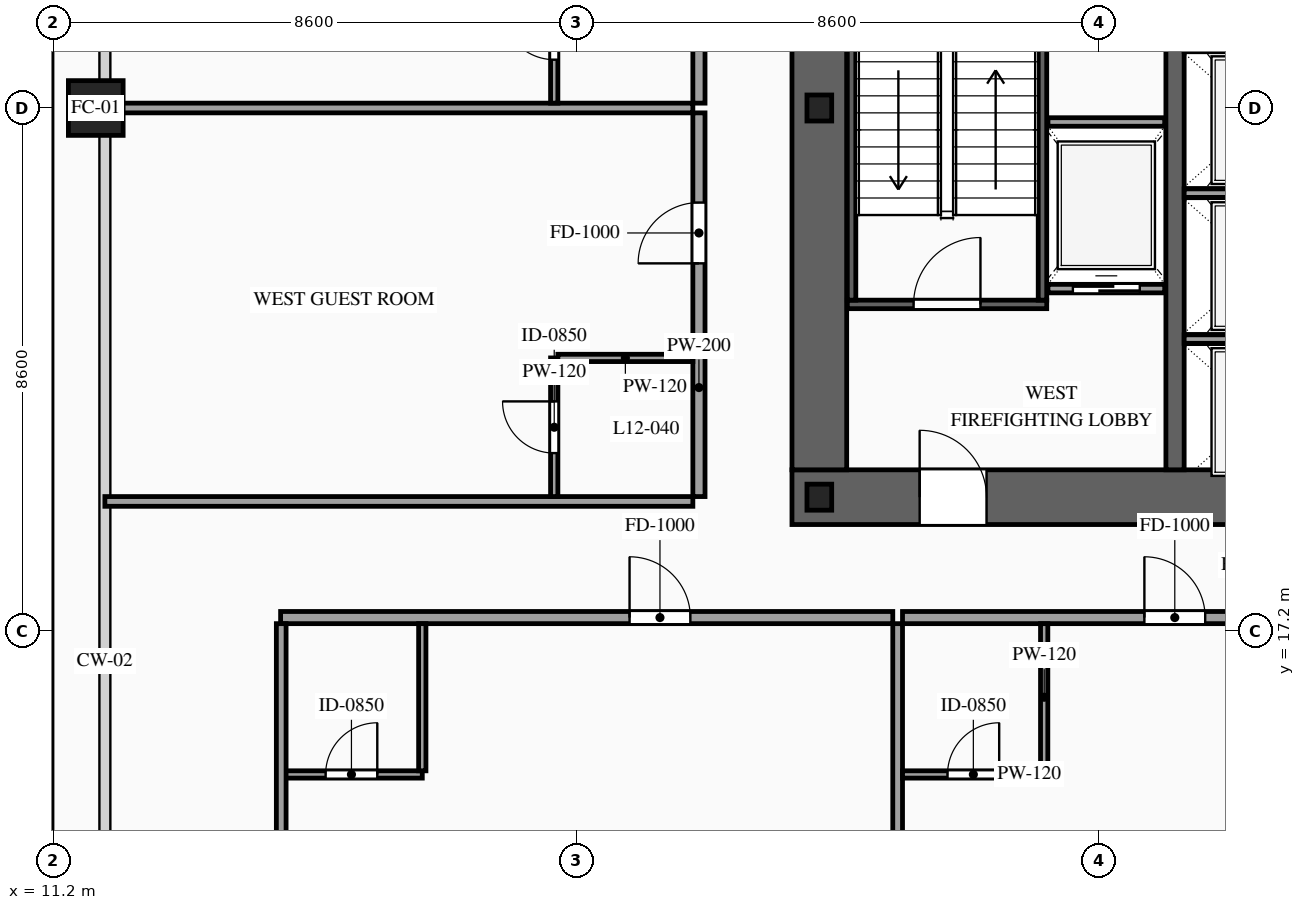
"""IFC4 building model, lengths in metres.
Left out: names, types, materials, properties, quantities, classifications, styles, units other than length and angle.
Written with IfcOpenShell. Run it as: python <this file> out.ifc"""

import sys

from ifc_helpers import new_model, si_unit, direction, frame, frame_2d, origin, origin_2d, place, context, subcontext, project, spatial, rectangle, hollow_rectangle, i_section, extrude, source, transform, mapped, element, fill, save


model = new_model("IFC4")
c1 = context("Model", 3, precision=1e-05, world=origin(), true_north=direction((0.0, 1.0)))
c2 = subcontext(c1, "Body", "Model", "MODEL_VIEW")
j1 = project(units=[si_unit("LENGTHUNIT", "METRE"), si_unit("PLANEANGLEUNIT", "RADIAN")], contexts=[c1])
p1 = place(None, origin())
s1 = spatial("IfcSite", under=j1, at=p1, CompositionType="ELEMENT")
p2 = place(p1, origin())
s2 = spatial("IfcBuilding", under=s1, at=p2, CompositionType="ELEMENT")
p3 = place(p2, frame((0.0, 0.0, 49.6)))
s3 = spatial("IfcBuildingStorey", under=s2, at=p3, CompositionType="ELEMENT", Elevation=49.6)
p4 = place(p3, frame((23.35, 19.4, 0.0), z_axis=(0.0, 0.0, 1.0), x_axis=(1.0, 0.0, 0.0)))
e1 = element("IfcWall", 1, at=p4, inside=s3, PredefinedType="SHEAR", context=c2, shape_type="SweptSolid", body=[
    extrude(rectangle(XDim=27.3, YDim=0.9, at=frame_2d((13.65, 0.0))), origin(), (0.0, 0.0, 1.0), 3.6),
])
p5 = place(p4, frame((2.1, 0.0, 0.0)))
e2 = element("IfcOpeningElement", 2, at=p5, cuts=e1, PredefinedType="OPENING", context=c2, shape_type="SweptSolid", body=[
    extrude(rectangle(XDim=1.1, YDim=2.2, at=frame_2d((0.55, 1.1))), frame((0.0, 0.465, 0.0), z_axis=(0.0, -1.0, 0.0), x_axis=(1.0, 0.0, 0.0)), (0.0, 0.0, 1.0), 0.93),
])
p6 = place(p4, frame((10.0, 0.0, 0.0)))
e3 = element("IfcOpeningElement", 3, at=p6, cuts=e1, PredefinedType="OPENING", context=c2, shape_type="SweptSolid", body=[
    extrude(rectangle(XDim=1.1, YDim=2.2, at=frame_2d((0.55, 1.1))), frame((0.0, 0.465, 0.0), z_axis=(0.0, -1.0, 0.0), x_axis=(1.0, 0.0, 0.0)), (0.0, 0.0, 1.0), 0.93),
])
p7 = place(p4, frame((23.2, 0.0, 0.0)))
e4 = element("IfcOpeningElement", 4, at=p7, cuts=e1, PredefinedType="OPENING", context=c2, shape_type="SweptSolid", body=[
    extrude(rectangle(XDim=1.1, YDim=2.2, at=frame_2d((0.55, 1.1))), frame((0.0, 0.465, 0.0), z_axis=(0.0, -1.0, 0.0), x_axis=(1.0, 0.0, 0.0)), (0.0, 0.0, 1.0), 0.93),
])
p8 = place(p4, frame((19.82, 0.0, 0.0)))
e5 = element("IfcOpeningElement", 5, at=p8, cuts=e1, PredefinedType="OPENING", context=c2, shape_type="SweptSolid", body=[
    extrude(rectangle(XDim=0.9, YDim=2.15, at=frame_2d((0.45, 1.075))), frame((0.0, 0.465, 0.0), z_axis=(0.0, -1.0, 0.0), x_axis=(1.0, 0.0, 0.0)), (0.0, 0.0, 1.0), 0.93),
])
p9 = place(p4, frame((18.38, 0.0, 0.0)))
e6 = element("IfcOpeningElement", 6, at=p9, cuts=e1, PredefinedType="OPENING", context=c2, shape_type="SweptSolid", body=[
    extrude(rectangle(XDim=0.9, YDim=2.15, at=frame_2d((0.45, 1.075))), frame((0.0, 0.465, 0.0), z_axis=(0.0, -1.0, 0.0), x_axis=(1.0, 0.0, 0.0)), (0.0, 0.0, 1.0), 0.93),
])
m1 = source(origin(), c2, "Body", "SweptSolid", [
    extrude(rectangle(XDim=11.9, YDim=0.9, at=frame_2d((5.95, 0.0))), origin(), (0.0, 0.0, 1.0), 3.6),
])
p10 = place(p3, frame((23.8, 19.85, 0.0), z_axis=(0.0, 0.0, 1.0), x_axis=(0.0, 1.0, 0.0)))
e7 = element("IfcWall", 7, at=p10, inside=s3, PredefinedType="SHEAR", context=c2, shape_type="MappedRepresentation", body=[
    mapped(m1, transform((0.0, 0.0, 0.0), scale=1.0)),
])
m2 = source(origin(), c2, "Body", "SweptSolid", [
    extrude(rectangle(XDim=11.9, YDim=0.3, at=frame_2d((5.95, 0.0))), origin(), (0.0, 0.0, 1.0), 3.6),
])
p11 = place(p3, frame((29.65, 19.85, 0.0), z_axis=(0.0, 0.0, 1.0), x_axis=(0.0, 1.0, 0.0)))
e8 = element("IfcWall", 8, at=p11, inside=s3, PredefinedType="SOLIDWALL", context=c2, shape_type="MappedRepresentation", body=[
    mapped(m2, transform((0.0, 0.0, 0.0), scale=1.0)),
])
m3 = source(origin(), c2, "Body", "SweptSolid", [
    extrude(i_section(OverallWidth=0.407, OverallDepth=0.428, WebThickness=0.02, FlangeThickness=0.035, at=origin_2d()), origin(), (0.0, 0.0, 1.0), 3.6),
])
for number, where, z_axis, x_axis in (
    (9, (23.8, 19.4, 0.0), (0.0, 0.0, 1.0), (1.0, 0.0, 0.0)),
    (10, (23.8, 25.8, 0.0), (0.0, 0.0, 1.0), (1.0, 0.0, 0.0)),
):
    element("IfcColumn", number, at=place(p3, frame(where, z_axis=z_axis, x_axis=x_axis)), inside=s3, PredefinedType="COLUMN", context=c2, shape_type="MappedRepresentation", body=[
        mapped(m3, transform((0.0, 0.0, 0.0), scale=1.0)),
    ])
m4 = source(origin(), c2, "Body", "SweptSolid", [
    extrude(hollow_rectangle(XDim=0.9, YDim=0.9, WallThickness=0.042, at=origin_2d()), origin(), (0.0, 0.0, 1.0), 3.6),
])
p12 = place(p3, frame((11.9, 25.8, 0.0), z_axis=(0.0, 0.0, 1.0), x_axis=(1.0, 0.0, 0.0)))
e11 = element("IfcColumn", 11, at=p12, inside=s3, PredefinedType="COLUMN", context=c2, shape_type="MappedRepresentation", body=[
    mapped(m4, transform((0.0, 0.0, 0.0), scale=1.0)),
])
p13 = place(p3, frame((27.56, 22.83, 0.0), z_axis=(0.0, 0.0, 1.0), x_axis=(1.0, 0.0, 0.0)))
e12 = element("IfcWall", 12, at=p13, inside=s3, PredefinedType="SOLIDWALL", context=c2, shape_type="SweptSolid", body=[
    extrude(rectangle(XDim=1.92, YDim=0.14, at=frame_2d((0.96, 0.0))), origin(), (0.0, 0.0, 1.0), 3.38),
])
p14 = place(p13, frame((0.41, 0.0, 0.0)))
e13 = element("IfcOpeningElement", 13, at=p14, cuts=e12, PredefinedType="OPENING", context=c2, shape_type="SweptSolid", body=[
    extrude(rectangle(XDim=1.1, YDim=2.2, at=frame_2d((0.55, 1.1))), frame((0.0, 0.085, 0.0), z_axis=(0.0, -1.0, 0.0), x_axis=(1.0, 0.0, 0.0)), (0.0, 0.0, 1.0), 0.17),
])
m5 = source(origin(), c2, "Body", "SweptSolid", [
    extrude(rectangle(XDim=1.92, YDim=0.14, at=frame_2d((0.96, 0.0))), origin(), (0.0, 0.0, 1.0), 3.38),
])
p15 = place(p3, frame((27.56, 25.57, 0.0), z_axis=(0.0, 0.0, 1.0), x_axis=(1.0, 0.0, 0.0)))
e14 = element("IfcWall", 14, at=p15, inside=s3, PredefinedType="SOLIDWALL", context=c2, shape_type="MappedRepresentation", body=[
    mapped(m5, transform((0.0, 0.0, 0.0), scale=1.0)),
])
m6 = source(origin(), c2, "Body", "SweptSolid", [
    extrude(rectangle(XDim=2.5, YDim=0.14, at=frame_2d((1.25, 0.0))), origin(), (0.0, 0.0, 1.0), 3.38),
])
for number, where, z_axis, x_axis in (
    (15, (29.8, 22.0, 0.0), (0.0, 0.0, 1.0), (1.0, 0.0, 0.0)),
    (16, (29.8, 24.4, 0.0), (0.0, 0.0, 1.0), (1.0, 0.0, 0.0)),
):
    element("IfcWall", number, at=place(p3, frame(where, z_axis=z_axis, x_axis=x_axis)), inside=s3, PredefinedType="SOLIDWALL", context=c2, shape_type="MappedRepresentation", body=[
        mapped(m6, transform((0.0, 0.0, 0.0), scale=1.0)),
    ])
p16 = place(p3, frame((24.26, 22.57, 0.0), z_axis=(0.0, 0.0, 1.0), x_axis=(1.0, 0.0, 0.0)))
e17 = element("IfcWall", 17, at=p16, inside=s3, PredefinedType="SOLIDWALL", context=c2, shape_type="SweptSolid", body=[
    extrude(rectangle(XDim=3.28, YDim=0.14, at=frame_2d((1.64, 0.0))), origin(), (0.0, 0.0, 1.0), 3.38),
])
p17 = place(p16, frame((1.09, 0.0, 0.0)))
e18 = element("IfcOpeningElement", 18, at=p17, cuts=e17, PredefinedType="OPENING", context=c2, shape_type="SweptSolid", body=[
    extrude(rectangle(XDim=1.1, YDim=2.2, at=frame_2d((0.55, 1.1))), frame((0.0, 0.085, 0.0), z_axis=(0.0, -1.0, 0.0), x_axis=(1.0, 0.0, 0.0)), (0.0, 0.0, 1.0), 0.17),
])
m7 = source(origin(), c2, "Body", "SweptSolid", [
    extrude(rectangle(XDim=8.94, YDim=0.14, at=frame_2d((4.47, 0.0))), origin(), (0.0, 0.0, 1.0), 3.38),
])
for number, where, z_axis, x_axis in (
    (19, (24.33, 22.64, 0.0), (0.0, 0.0, 1.0), (0.0, 1.0, 0.0)),
    (20, (27.47, 22.64, 0.0), (0.0, 0.0, 1.0), (0.0, 1.0, 0.0)),
):
    element("IfcWall", number, at=place(p3, frame(where, z_axis=z_axis, x_axis=x_axis)), inside=s3, PredefinedType="SOLIDWALL", context=c2, shape_type="MappedRepresentation", body=[
        mapped(m7, transform((0.0, 0.0, 0.0), scale=1.0)),
    ])
p18 = place(p3, frame((14.94, 17.42, 0.0), z_axis=(0.0, 0.0, 1.0), x_axis=(1.0, 0.0, 0.0)))
e21 = element("IfcWall", 21, at=p18, inside=s3, PredefinedType="PARTITIONING", context=c2, shape_type="SweptSolid", body=[
    extrude(rectangle(XDim=10.068, YDim=0.2, at=frame_2d((5.034, 0.0))), origin(), (0.0, 0.0, 1.0), 3.38),
])
p19 = place(p18, frame((5.739, 0.0, 0.0)))
e22 = element("IfcOpeningElement", 22, at=p19, cuts=e21, PredefinedType="OPENING", context=c2, shape_type="SweptSolid", body=[
    extrude(rectangle(XDim=1.0, YDim=2.2, at=frame_2d((0.5, 1.1))), frame((0.0, 0.115, 0.0), z_axis=(0.0, -1.0, 0.0), x_axis=(1.0, 0.0, 0.0)), (0.0, 0.0, 1.0), 0.23),
])
m8 = source(origin(), c2, "Body", "SweptSolid", [
    extrude(rectangle(XDim=16.47, YDim=0.16, at=frame_2d((8.235, 0.0))), origin(), (0.0, 0.0, 1.0), 3.38),
])
p20 = place(p3, frame((25.088, 0.85, 0.0), z_axis=(0.0, 0.0, 1.0), x_axis=(0.0, 1.0, 0.0)))
e23 = element("IfcWall", 23, at=p20, inside=s3, PredefinedType="PARTITIONING", context=c2, shape_type="MappedRepresentation", body=[
    mapped(m8, transform((0.0, 0.0, 0.0), scale=1.0)),
])
p21 = place(p3, frame((14.94, 14.84, 0.0), z_axis=(0.0, 0.0, 1.0), x_axis=(1.0, 0.0, 0.0)))
e24 = element("IfcWall", 24, at=p21, inside=s3, PredefinedType="PARTITIONING", context=c2, shape_type="SweptSolid", body=[
    extrude(rectangle(XDim=2.33, YDim=0.12, at=frame_2d((1.165, 0.0))), origin(), (0.0, 0.0, 1.0), 3.38),
])
p22 = place(p21, frame((0.74, 0.0, 0.0)))
e25 = element("IfcOpeningElement", 25, at=p22, cuts=e24, PredefinedType="OPENING", context=c2, shape_type="SweptSolid", body=[
    extrude(rectangle(XDim=0.85, YDim=2.1, at=frame_2d((0.425, 1.05))), frame((0.0, 0.075, 0.0), z_axis=(0.0, -1.0, 0.0), x_axis=(1.0, 0.0, 0.0)), (0.0, 0.0, 1.0), 0.15),
])
m9 = source(origin(), c2, "Body", "SweptSolid", [
    extrude(rectangle(XDim=2.42, YDim=0.12, at=frame_2d((1.21, 0.0))), origin(), (0.0, 0.0, 1.0), 3.38),
])
p23 = place(p3, frame((17.27, 14.9, 0.0), z_axis=(0.0, 0.0, 1.0), x_axis=(0.0, 1.0, 0.0)))
e26 = element("IfcWall", 26, at=p23, inside=s3, PredefinedType="PARTITIONING", context=c2, shape_type="MappedRepresentation", body=[
    mapped(m9, transform((0.0, 0.0, 0.0), scale=1.0)),
])
p24 = place(p3, frame((25.168, 17.42, 0.0), z_axis=(0.0, 0.0, 1.0), x_axis=(1.0, 0.0, 0.0)))
e27 = element("IfcWall", 27, at=p24, inside=s3, PredefinedType="PARTITIONING", context=c2, shape_type="SweptSolid", body=[
    extrude(rectangle(XDim=6.546, YDim=0.2, at=frame_2d((3.273, 0.0))), origin(), (0.0, 0.0, 1.0), 3.38),
])
p25 = place(p24, frame((3.978, 0.0, 0.0)))
e28 = element("IfcOpeningElement", 28, at=p25, cuts=e27, PredefinedType="OPENING", context=c2, shape_type="SweptSolid", body=[
    extrude(rectangle(XDim=1.0, YDim=2.2, at=frame_2d((0.5, 1.1))), frame((0.0, 0.115, 0.0), z_axis=(0.0, -1.0, 0.0), x_axis=(1.0, 0.0, 0.0)), (0.0, 0.0, 1.0), 0.23),
])
p26 = place(p3, frame((25.168, 14.84, 0.0), z_axis=(0.0, 0.0, 1.0), x_axis=(1.0, 0.0, 0.0)))
e29 = element("IfcWall", 29, at=p26, inside=s3, PredefinedType="PARTITIONING", context=c2, shape_type="SweptSolid", body=[
    extrude(rectangle(XDim=2.33, YDim=0.12, at=frame_2d((1.165, 0.0))), origin(), (0.0, 0.0, 1.0), 3.38),
])
p27 = place(p26, frame((0.74, 0.0, 0.0)))
e30 = element("IfcOpeningElement", 30, at=p27, cuts=e29, PredefinedType="OPENING", context=c2, shape_type="SweptSolid", body=[
    extrude(rectangle(XDim=0.85, YDim=2.1, at=frame_2d((0.425, 1.05))), frame((0.0, 0.075, 0.0), z_axis=(0.0, -1.0, 0.0), x_axis=(1.0, 0.0, 0.0)), (0.0, 0.0, 1.0), 0.15),
])
p28 = place(p3, frame((27.498, 14.9, 0.0), z_axis=(0.0, 0.0, 1.0), x_axis=(0.0, 1.0, 0.0)))
e31 = element("IfcWall", 31, at=p28, inside=s3, PredefinedType="PARTITIONING", context=c2, shape_type="MappedRepresentation", body=[
    mapped(m9, transform((0.0, 0.0, 0.0), scale=1.0)),
])
m10 = source(origin(), c2, "Body", "SweptSolid", [
    extrude(rectangle(XDim=16.32, YDim=0.16, at=frame_2d((8.16, 0.0))), origin(), (0.0, 0.0, 1.0), 3.38),
])
p29 = place(p3, frame((14.95, 1.0, 0.0), z_axis=(0.0, 0.0, 1.0), x_axis=(0.0, 1.0, 0.0)))
e32 = element("IfcWall", 32, at=p29, inside=s3, PredefinedType="PARTITIONING", context=c2, shape_type="MappedRepresentation", body=[
    mapped(m10, transform((0.0, 0.0, 0.0), scale=1.0)),
])
p30 = place(p3, frame((21.82, 19.41, 0.0), z_axis=(0.0, 0.0, 1.0), x_axis=(0.0, 1.0, 0.0)))
e33 = element("IfcWall", 33, at=p30, inside=s3, PredefinedType="PARTITIONING", context=c2, shape_type="SweptSolid", body=[
    extrude(rectangle(XDim=6.31, YDim=0.2, at=frame_2d((3.155, 0.0))), origin(), (0.0, 0.0, 1.0), 3.38),
])
p31 = place(p30, frame((3.835, 0.0, 0.0)))
e34 = element("IfcOpeningElement", 34, at=p31, cuts=e33, PredefinedType="OPENING", context=c2, shape_type="SweptSolid", body=[
    extrude(rectangle(XDim=1.0, YDim=2.2, at=frame_2d((0.5, 1.1))), frame((0.0, 0.115, 0.0), z_axis=(0.0, -1.0, 0.0), x_axis=(1.0, 0.0, 0.0)), (0.0, 0.0, 1.0), 0.23),
])
m11 = source(origin(), c2, "Body", "SweptSolid", [
    extrude(rectangle(XDim=9.67, YDim=0.16, at=frame_2d((4.835, 0.0))), origin(), (0.0, 0.0, 1.0), 2.575),
])
p32 = place(p3, frame((12.05, 25.8, 0.0), z_axis=(0.0, 0.0, 1.0), x_axis=(1.0, 0.0, 0.0)))
e35 = element("IfcWall", 35, at=p32, inside=s3, PredefinedType="PARTITIONING", context=c2, shape_type="MappedRepresentation", body=[
    mapped(m11, transform((0.0, 0.0, 0.0), scale=1.0)),
])
m12 = source(origin(), c2, "Body", "SweptSolid", [
    extrude(rectangle(XDim=9.67, YDim=0.16, at=frame_2d((4.835, 0.0))), origin(), (0.0, 0.0, 1.0), 2.875),
])
p33 = place(p3, frame((12.05, 19.33, 0.0), z_axis=(0.0, 0.0, 1.0), x_axis=(1.0, 0.0, 0.0)))
e36 = element("IfcWall", 36, at=p33, inside=s3, PredefinedType="PARTITIONING", context=c2, shape_type="MappedRepresentation", body=[
    mapped(m12, transform((0.0, 0.0, 0.0), scale=1.0)),
])
p34 = place(p3, frame((19.44, 19.41, 0.0), z_axis=(0.0, 0.0, 1.0), x_axis=(0.0, 1.0, 0.0)))
e37 = element("IfcWall", 37, at=p34, inside=s3, PredefinedType="PARTITIONING", context=c2, shape_type="SweptSolid", body=[
    extrude(rectangle(XDim=2.28, YDim=0.12, at=frame_2d((1.14, 0.0))), origin(), (0.0, 0.0, 1.0), 3.38),
])
p35 = place(p34, frame((0.715, 0.0, 0.0)))
e38 = element("IfcOpeningElement", 38, at=p35, cuts=e37, PredefinedType="OPENING", context=c2, shape_type="SweptSolid", body=[
    extrude(rectangle(XDim=0.85, YDim=2.1, at=frame_2d((0.425, 1.05))), frame((0.0, 0.075, 0.0), z_axis=(0.0, -1.0, 0.0), x_axis=(1.0, 0.0, 0.0)), (0.0, 0.0, 1.0), 0.15),
])
m13 = source(origin(), c2, "Body", "SweptSolid", [
    extrude(rectangle(XDim=2.22, YDim=0.12, at=frame_2d((1.11, 0.0))), origin(), (0.0, 0.0, 1.0), 3.38),
])
p36 = place(p3, frame((19.5, 21.69, 0.0), z_axis=(0.0, 0.0, 1.0), x_axis=(1.0, 0.0, 0.0)))
e39 = element("IfcWall", 39, at=p36, inside=s3, PredefinedType="PARTITIONING", context=c2, shape_type="MappedRepresentation", body=[
    mapped(m13, transform((0.0, 0.0, 0.0), scale=1.0)),
])
p37 = place(p3, frame((21.82, 25.88, 0.0), z_axis=(0.0, 0.0, 1.0), x_axis=(0.0, 1.0, 0.0)))
e40 = element("IfcWall", 40, at=p37, inside=s3, PredefinedType="PARTITIONING", context=c2, shape_type="SweptSolid", body=[
    extrude(rectangle(XDim=6.31, YDim=0.2, at=frame_2d((3.155, 0.0))), origin(), (0.0, 0.0, 1.0), 3.38),
])
p38 = place(p37, frame((3.835, 0.0, 0.0)))
e41 = element("IfcOpeningElement", 41, at=p38, cuts=e40, PredefinedType="OPENING", context=c2, shape_type="SweptSolid", body=[
    extrude(rectangle(XDim=1.0, YDim=2.2, at=frame_2d((0.5, 1.1))), frame((0.0, 0.115, 0.0), z_axis=(0.0, -1.0, 0.0), x_axis=(1.0, 0.0, 0.0)), (0.0, 0.0, 1.0), 0.23),
])
p39 = place(p3, frame((19.44, 25.88, 0.0), z_axis=(0.0, 0.0, 1.0), x_axis=(0.0, 1.0, 0.0)))
e42 = element("IfcWall", 42, at=p39, inside=s3, PredefinedType="PARTITIONING", context=c2, shape_type="SweptSolid", body=[
    extrude(rectangle(XDim=2.28, YDim=0.12, at=frame_2d((1.14, 0.0))), origin(), (0.0, 0.0, 1.0), 3.38),
])
p40 = place(p39, frame((0.715, 0.0, 0.0)))
e43 = element("IfcOpeningElement", 43, at=p40, cuts=e42, PredefinedType="OPENING", context=c2, shape_type="SweptSolid", body=[
    extrude(rectangle(XDim=0.85, YDim=2.1, at=frame_2d((0.425, 1.05))), frame((0.0, 0.075, 0.0), z_axis=(0.0, -1.0, 0.0), x_axis=(1.0, 0.0, 0.0)), (0.0, 0.0, 1.0), 0.15),
])
m14 = source(origin(), c2, "Body", "SweptSolid", [
    extrude(rectangle(XDim=1.1, YDim=2.2, at=frame_2d((0.55, 1.1))), frame((0.0, 0.025, 0.0), z_axis=(0.0, -1.0, 0.0), x_axis=(1.0, 0.0, 0.0)), (0.0, 0.0, 1.0), 0.05),
])
p41 = place(p14, origin())
e44 = element("IfcDoor", 44, at=p41, inside=s3, OperationType="SLIDING_TO_LEFT", PredefinedType="DOOR", context=c2, shape_type="MappedRepresentation", body=[
    mapped(m14, transform((0.0, 0.0, 0.0), scale=1.0)),
])
fill(e13, e44)
m15 = source(origin(), c2, "Body", "SweptSolid", [
    extrude(rectangle(XDim=1.1, YDim=2.2, at=frame_2d((0.55, 1.1))), frame((0.0, 0.025, 0.0), z_axis=(0.0, -1.0, 0.0), x_axis=(1.0, 0.0, 0.0)), (0.0, 0.0, 1.0), 0.05),
])
p42 = place(p17, origin())
e45 = element("IfcDoor", 45, at=p42, inside=s3, OperationType="SINGLE_SWING_RIGHT", PredefinedType="DOOR", context=c2, shape_type="MappedRepresentation", body=[
    mapped(m15, transform((0.0, 0.0, 0.0), scale=1.0)),
])
fill(e18, e45)
p43 = place(p5, origin())
e46 = element("IfcDoor", 46, at=p43, inside=s3, OperationType="SINGLE_SWING_LEFT", PredefinedType="DOOR", context=c2, shape_type="MappedRepresentation", body=[
    mapped(m15, transform((0.0, 0.0, 0.0), scale=1.0)),
])
fill(e2, e46)
m16 = source(origin(), c2, "Body", "SweptSolid", [
    extrude(rectangle(XDim=1.0, YDim=2.2, at=frame_2d((0.5, 1.1))), frame((0.0, 0.025, 0.0), z_axis=(0.0, -1.0, 0.0), x_axis=(1.0, 0.0, 0.0)), (0.0, 0.0, 1.0), 0.05),
])
p44 = place(p19, origin())
e47 = element("IfcDoor", 47, at=p44, inside=s3, OperationType="SINGLE_SWING_LEFT", PredefinedType="DOOR", context=c2, shape_type="MappedRepresentation", body=[
    mapped(m16, transform((0.0, 0.0, 0.0), scale=1.0)),
])
fill(e22, e47)
m17 = source(origin(), c2, "Body", "SweptSolid", [
    extrude(rectangle(XDim=0.85, YDim=2.1, at=frame_2d((0.425, 1.05))), frame((0.0, 0.025, 0.0), z_axis=(0.0, -1.0, 0.0), x_axis=(1.0, 0.0, 0.0)), (0.0, 0.0, 1.0), 0.05),
])
p45 = place(p22, origin())
e48 = element("IfcDoor", 48, at=p45, inside=s3, OperationType="SINGLE_SWING_RIGHT", PredefinedType="DOOR", context=c2, shape_type="MappedRepresentation", body=[
    mapped(m17, transform((0.0, 0.0, 0.0), scale=1.0)),
])
fill(e25, e48)
p46 = place(p25, origin())
e49 = element("IfcDoor", 49, at=p46, inside=s3, OperationType="SINGLE_SWING_LEFT", PredefinedType="DOOR", context=c2, shape_type="MappedRepresentation", body=[
    mapped(m16, transform((0.0, 0.0, 0.0), scale=1.0)),
])
fill(e28, e49)
p47 = place(p27, origin())
e50 = element("IfcDoor", 50, at=p47, inside=s3, OperationType="SINGLE_SWING_RIGHT", PredefinedType="DOOR", context=c2, shape_type="MappedRepresentation", body=[
    mapped(m17, transform((0.0, 0.0, 0.0), scale=1.0)),
])
fill(e30, e50)
p48 = place(p31, origin())
e51 = element("IfcDoor", 51, at=p48, inside=s3, OperationType="SINGLE_SWING_LEFT", PredefinedType="DOOR", context=c2, shape_type="MappedRepresentation", body=[
    mapped(m16, transform((0.0, 0.0, 0.0), scale=1.0)),
])
fill(e34, e51)
p49 = place(p35, origin())
e52 = element("IfcDoor", 52, at=p49, inside=s3, OperationType="SINGLE_SWING_RIGHT", PredefinedType="DOOR", context=c2, shape_type="MappedRepresentation", body=[
    mapped(m17, transform((0.0, 0.0, 0.0), scale=1.0)),
])
fill(e38, e52)
p50 = place(p40, origin())
e53 = element("IfcDoor", 53, at=p50, inside=s3, OperationType="SINGLE_SWING_RIGHT", PredefinedType="DOOR", context=c2, shape_type="MappedRepresentation", body=[
    mapped(m17, transform((0.0, 0.0, 0.0), scale=1.0)),
])
fill(e43, e53)
save(model, sys.argv[1])
